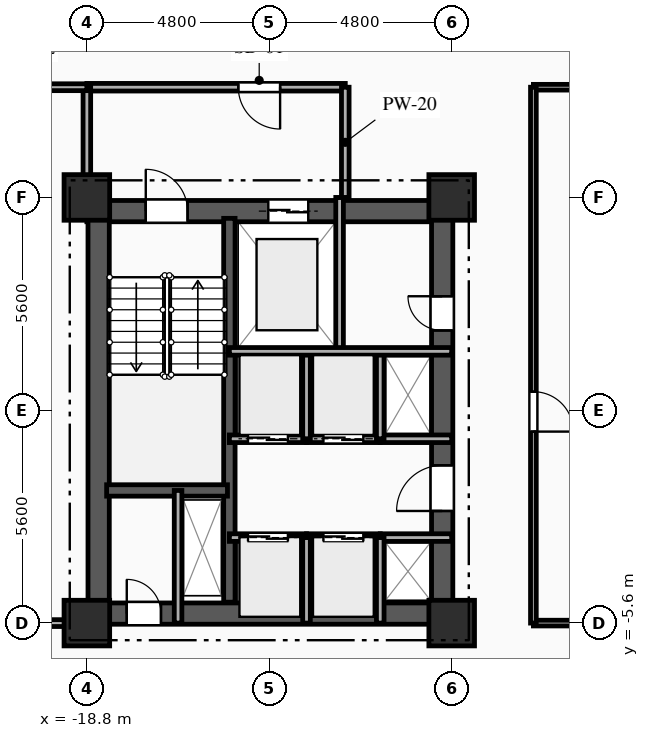
"""IFC4 building model, lengths in metres.
Left out: names, types, materials, properties, quantities, classifications, styles, units other than length and angle.
Written with IfcOpenShell. Run it as: python <this file> out.ifc"""

import sys

from ifc_helpers import new_model, si_unit, direction, frame, frame_2d, origin, origin_2d, place, context, subcontext, project, spatial, rectangle, extrude, element, fill, save


model = new_model("IFC4")
c1 = context("Model", 3, precision=1e-05, world=origin(), true_north=direction((0.0, 1.0)))
c2 = subcontext(c1, "Body", "Model", "MODEL_VIEW")
j1 = project(units=[si_unit("LENGTHUNIT", "METRE"), si_unit("PLANEANGLEUNIT", "RADIAN")], contexts=[c1])
p1 = place(None, origin())
s1 = spatial("IfcSite", under=j1, at=p1, CompositionType="ELEMENT")
p2 = place(p1, origin())
s2 = spatial("IfcBuilding", under=s1, at=p2, CompositionType="ELEMENT")
p3 = place(p2, frame((0.0, 0.0, 33.7)))
s3 = spatial("IfcBuildingStorey", under=s2, at=p3, CompositionType="ELEMENT", Elevation=33.7)
for number, where, z_axis, x_axis in (
    (1, (-18.8, -5.6, 0.0), (0.0, 0.0, 1.0), (1.0, 0.0, 0.0)),
    (2, (-18.8, 5.6, 0.0), (0.0, 0.0, 1.0), (1.0, 0.0, 0.0)),
    (3, (-9.2, -5.6, 0.0), (0.0, 0.0, 1.0), (1.0, 0.0, 0.0)),
    (4, (-9.2, 5.6, 0.0), (0.0, 0.0, 1.0), (1.0, 0.0, 0.0)),
):
    element("IfcColumn", number, at=place(p3, frame(where, z_axis=z_axis, x_axis=x_axis)), inside=s3, PredefinedType="COLUMN", context=c2, shape_type="SweptSolid", body=[
        extrude(rectangle(XDim=1.2, YDim=1.2, at=origin_2d()), origin(), (0.0, 0.0, 1.0), 3.35),
    ])
p4 = place(p3, frame((-18.8, 5.24, 0.0), z_axis=(0.0, 0.0, 1.0), x_axis=(1.0, 0.0, 0.0)))
e5 = element("IfcWall", 5, at=p4, inside=s3, PredefinedType="SHEAR", context=c2, shape_type="SweptSolid", body=[
    extrude(rectangle(XDim=9.6, YDim=0.56, at=frame_2d((4.8, 0.0))), origin(), (0.0, 0.0, 1.0), 3.035),
])
p5 = place(p4, frame((1.55, 0.0, 0.0)))
e6 = element("IfcOpeningElement", 6, at=p5, cuts=e5, PredefinedType="OPENING", context=c2, shape_type="SweptSolid", body=[
    extrude(rectangle(XDim=1.1, YDim=2.15, at=frame_2d((0.55, 1.075))), frame((0.0, 0.29, 0.0), z_axis=(0.0, -1.0, 0.0), x_axis=(1.0, 0.0, 0.0)), (0.0, 0.0, 1.0), 0.58),
])
p6 = place(p4, frame((4.775, 0.0, 0.0)))
e7 = element("IfcOpeningElement", 7, at=p6, cuts=e5, PredefinedType="OPENING", context=c2, shape_type="SweptSolid", body=[
    extrude(rectangle(XDim=1.05, YDim=2.1, at=frame_2d((0.525, 1.05))), frame((0.0, 0.29, 0.0), z_axis=(0.0, -1.0, 0.0), x_axis=(1.0, 0.0, 0.0)), (0.0, 0.0, 1.0), 0.58),
])
p7 = place(p3, frame((-18.8, -5.35, 0.0), z_axis=(0.0, 0.0, 1.0), x_axis=(1.0, 0.0, 0.0)))
e8 = element("IfcWall", 8, at=p7, inside=s3, PredefinedType="SHEAR", context=c2, shape_type="SweptSolid", body=[
    extrude(rectangle(XDim=9.6, YDim=0.56, at=frame_2d((4.8, 0.0))), origin(), (0.0, 0.0, 1.0), 3.035),
])
p8 = place(p7, frame((1.05, 0.0, 0.0)))
e9 = element("IfcOpeningElement", 9, at=p8, cuts=e8, PredefinedType="OPENING", context=c2, shape_type="SweptSolid", body=[
    extrude(rectangle(XDim=0.9, YDim=2.1, at=frame_2d((0.45, 1.05))), frame((0.0, 0.29, 0.0), z_axis=(0.0, -1.0, 0.0), x_axis=(1.0, 0.0, 0.0)), (0.0, 0.0, 1.0), 0.58),
])
p9 = place(p3, frame((-18.49, -5.05, 0.0), z_axis=(0.0, 0.0, 1.0), x_axis=(0.0, 1.0, 0.0)))
e10 = element("IfcWall", 10, at=p9, inside=s3, PredefinedType="SHEAR", context=c2, shape_type="SweptSolid", body=[
    extrude(rectangle(XDim=10.1, YDim=0.56, at=frame_2d((5.05, 0.0))), origin(), (0.0, 0.0, 1.0), 3.035),
])
p10 = place(p3, frame((-9.45, -5.05, 0.0), z_axis=(0.0, 0.0, 1.0), x_axis=(0.0, 1.0, 0.0)))
e11 = element("IfcWall", 11, at=p10, inside=s3, PredefinedType="SHEAR", context=c2, shape_type="SweptSolid", body=[
    extrude(rectangle(XDim=10.1, YDim=0.56, at=frame_2d((5.05, 0.0))), origin(), (0.0, 0.0, 1.0), 3.035),
])
p11 = place(p10, frame((7.15, 0.0, 0.0)))
e12 = element("IfcOpeningElement", 12, at=p11, cuts=e11, PredefinedType="OPENING", context=c2, shape_type="SweptSolid", body=[
    extrude(rectangle(XDim=0.9, YDim=2.1, at=frame_2d((0.45, 1.05))), frame((0.0, 0.29, 0.0), z_axis=(0.0, -1.0, 0.0), x_axis=(1.0, 0.0, 0.0)), (0.0, 0.0, 1.0), 0.58),
])
p12 = place(p10, frame((2.4, 0.0, 0.0)))
e13 = element("IfcOpeningElement", 13, at=p12, cuts=e11, PredefinedType="OPENING", context=c2, shape_type="SweptSolid", body=[
    extrude(rectangle(XDim=1.2, YDim=2.15, at=frame_2d((0.6, 1.075))), frame((0.0, 0.29, 0.0), z_axis=(0.0, -1.0, 0.0), x_axis=(1.0, 0.0, 0.0)), (0.0, 0.0, 1.0), 0.58),
])
p13 = place(p3, frame((-15.05, -5.05, 0.0), z_axis=(0.0, 0.0, 1.0), x_axis=(0.0, 1.0, 0.0)))
e14 = element("IfcWall", 14, at=p13, inside=s3, PredefinedType="SHEAR", context=c2, shape_type="SweptSolid", body=[
    extrude(rectangle(XDim=10.1, YDim=0.3, at=frame_2d((5.05, 0.0))), origin(), (0.0, 0.0, 1.0), 3.035),
])
p14 = place(p3, frame((-18.28, -2.11, 0.0), z_axis=(0.0, 0.0, 1.0), x_axis=(1.0, 0.0, 0.0)))
e15 = element("IfcWall", 15, at=p14, inside=s3, PredefinedType="SHEAR", context=c2, shape_type="SweptSolid", body=[
    extrude(rectangle(XDim=3.18, YDim=0.3, at=frame_2d((1.59, 0.0))), origin(), (0.0, 0.0, 1.0), 3.035),
])
p15 = place(p3, frame((-16.4, -5.6, 0.0), z_axis=(0.0, 0.0, 1.0), x_axis=(0.0, 1.0, 0.0)))
e16 = element("IfcWall", 16, at=p15, inside=s3, PredefinedType="PARTITIONING", context=c2, shape_type="SweptSolid", body=[
    extrude(rectangle(XDim=3.49, YDim=0.2, at=frame_2d((1.745, 0.0))), origin(), (0.0, 0.0, 1.0), 3.035),
])
p16 = place(p3, frame((-12.15, 1.55, 0.0), z_axis=(0.0, 0.0, 1.0), x_axis=(0.0, 1.0, 0.0)))
e17 = element("IfcWall", 17, at=p16, inside=s3, PredefinedType="PARTITIONING", context=c2, shape_type="SweptSolid", body=[
    extrude(rectangle(XDim=4.05, YDim=0.2, at=frame_2d((2.025, 0.0))), origin(), (0.0, 0.0, 1.0), 3.035),
])
p17 = place(p3, frame((-12.0, 8.5, 0.0), z_axis=(0.0, 0.0, 1.0), x_axis=(-1.0, 0.0, 0.0)))
e18 = element("IfcWall", 18, at=p17, inside=s3, PredefinedType="PARTITIONING", context=c2, shape_type="SweptSolid", body=[
    extrude(rectangle(XDim=6.8, YDim=0.2, at=frame_2d((3.4, 0.0))), origin(), (0.0, 0.0, 1.0), 3.035),
])
p18 = place(p17, frame((1.715, 0.0, 0.0)))
e19 = element("IfcOpeningElement", 19, at=p18, cuts=e18, PredefinedType="OPENING", context=c2, shape_type="SweptSolid", body=[
    extrude(rectangle(XDim=1.1, YDim=2.15, at=frame_2d((0.55, 1.075))), frame((0.0, 0.11, 0.0), z_axis=(0.0, -1.0, 0.0), x_axis=(1.0, 0.0, 0.0)), (0.0, 0.0, 1.0), 0.22),
])
p19 = place(p3, frame((-12.0, 5.6, 0.0), z_axis=(0.0, 0.0, 1.0), x_axis=(0.0, 1.0, 0.0)))
e20 = element("IfcWall", 20, at=p19, inside=s3, PredefinedType="PARTITIONING", context=c2, shape_type="SweptSolid", body=[
    extrude(rectangle(XDim=2.9, YDim=0.2, at=frame_2d((1.45, 0.0))), origin(), (0.0, 0.0, 1.0), 3.035),
])
p20 = place(p3, frame((-18.8, 8.5, 0.0), z_axis=(0.0, 0.0, 1.0), x_axis=(0.0, -1.0, 0.0)))
e21 = element("IfcWall", 21, at=p20, inside=s3, PredefinedType="PARTITIONING", context=c2, shape_type="SweptSolid", body=[
    extrude(rectangle(XDim=2.9, YDim=0.2, at=frame_2d((1.45, 0.0))), origin(), (0.0, 0.0, 1.0), 2.52),
])
p21 = place(p3, frame((-15.05, -3.35, 0.0), z_axis=(0.0, 0.0, 1.0), x_axis=(1.0, 0.0, 0.0)))
e22 = element("IfcWall", 22, at=p21, inside=s3, PredefinedType="PARTITIONING", context=c2, shape_type="SweptSolid", body=[
    extrude(rectangle(XDim=2.03, YDim=0.2, at=frame_2d((1.015, 0.0))), origin(), (0.0, 0.0, 1.0), 3.035),
])
p22 = place(p21, frame((0.49, 0.0, 0.0)))
e23 = element("IfcOpeningElement", 23, at=p22, cuts=e22, PredefinedType="OPENING", context=c2, shape_type="SweptSolid", body=[
    extrude(rectangle(XDim=1.05, YDim=2.1, at=frame_2d((0.525, 1.05))), frame((0.0, 0.11, 0.0), z_axis=(0.0, -1.0, 0.0), x_axis=(1.0, 0.0, 0.0)), (0.0, 0.0, 1.0), 0.22),
])
p23 = place(p3, frame((-13.02, -3.35, 0.0), z_axis=(0.0, 0.0, 1.0), x_axis=(1.0, 0.0, 0.0)))
e24 = element("IfcWall", 24, at=p23, inside=s3, PredefinedType="PARTITIONING", context=c2, shape_type="SweptSolid", body=[
    extrude(rectangle(XDim=1.94, YDim=0.2, at=frame_2d((0.97, 0.0))), origin(), (0.0, 0.0, 1.0), 3.035),
])
p24 = place(p23, frame((0.445, 0.0, 0.0)))
e25 = element("IfcOpeningElement", 25, at=p24, cuts=e24, PredefinedType="OPENING", context=c2, shape_type="SweptSolid", body=[
    extrude(rectangle(XDim=1.05, YDim=2.1, at=frame_2d((0.525, 1.05))), frame((0.0, 0.11, 0.0), z_axis=(0.0, -1.0, 0.0), x_axis=(1.0, 0.0, 0.0)), (0.0, 0.0, 1.0), 0.22),
])
p25 = place(p3, frame((-11.08, -3.35, 0.0), z_axis=(0.0, 0.0, 1.0), x_axis=(1.0, 0.0, 0.0)))
e26 = element("IfcWall", 26, at=p25, inside=s3, PredefinedType="PARTITIONING", context=c2, shape_type="SweptSolid", body=[
    extrude(rectangle(XDim=1.88, YDim=0.2, at=frame_2d((0.94, 0.0))), origin(), (0.0, 0.0, 1.0), 2.75),
])
p26 = place(p3, frame((-13.02, -0.75, 0.0), z_axis=(0.0, 0.0, 1.0), x_axis=(-1.0, 0.0, 0.0)))
e27 = element("IfcWall", 27, at=p26, inside=s3, PredefinedType="PARTITIONING", context=c2, shape_type="SweptSolid", body=[
    extrude(rectangle(XDim=2.03, YDim=0.2, at=frame_2d((1.015, 0.0))), origin(), (0.0, 0.0, 1.0), 3.035),
])
p27 = place(p26, frame((0.49, 0.0, 0.0)))
e28 = element("IfcOpeningElement", 28, at=p27, cuts=e27, PredefinedType="OPENING", context=c2, shape_type="SweptSolid", body=[
    extrude(rectangle(XDim=1.05, YDim=2.1, at=frame_2d((0.525, 1.05))), frame((0.0, 0.11, 0.0), z_axis=(0.0, -1.0, 0.0), x_axis=(1.0, 0.0, 0.0)), (0.0, 0.0, 1.0), 0.22),
])
p28 = place(p3, frame((-11.08, -0.75, 0.0), z_axis=(0.0, 0.0, 1.0), x_axis=(-1.0, 0.0, 0.0)))
e29 = element("IfcWall", 29, at=p28, inside=s3, PredefinedType="PARTITIONING", context=c2, shape_type="SweptSolid", body=[
    extrude(rectangle(XDim=1.94, YDim=0.2, at=frame_2d((0.97, 0.0))), origin(), (0.0, 0.0, 1.0), 3.035),
])
p29 = place(p28, frame((0.445, 0.0, 0.0)))
e30 = element("IfcOpeningElement", 30, at=p29, cuts=e29, PredefinedType="OPENING", context=c2, shape_type="SweptSolid", body=[
    extrude(rectangle(XDim=1.05, YDim=2.1, at=frame_2d((0.525, 1.05))), frame((0.0, 0.11, 0.0), z_axis=(0.0, -1.0, 0.0), x_axis=(1.0, 0.0, 0.0)), (0.0, 0.0, 1.0), 0.22),
])
p30 = place(p3, frame((-9.2, -0.75, 0.0), z_axis=(0.0, 0.0, 1.0), x_axis=(-1.0, 0.0, 0.0)))
e31 = element("IfcWall", 31, at=p30, inside=s3, PredefinedType="PARTITIONING", context=c2, shape_type="SweptSolid", body=[
    extrude(rectangle(XDim=1.88, YDim=0.2, at=frame_2d((0.94, 0.0))), origin(), (0.0, 0.0, 1.0), 3.035),
])
for number, where, z_axis, x_axis in (
    (32, (-13.02, -5.6, 0.0), (0.0, 0.0, 1.0), (0.0, 1.0, 0.0)),
    (33, (-11.08, -5.6, 0.0), (0.0, 0.0, 1.0), (0.0, 1.0, 0.0)),
):
    element("IfcWall", number, at=place(p3, frame(where, z_axis=z_axis, x_axis=x_axis)), inside=s3, PredefinedType="PARTITIONING", context=c2, shape_type="SweptSolid", body=[
        extrude(rectangle(XDim=2.25, YDim=0.2, at=frame_2d((1.125, 0.0))), origin(), (0.0, 0.0, 1.0), 3.035),
    ])
for number, where, z_axis, x_axis in (
    (34, (-13.02, -0.75, 0.0), (0.0, 0.0, 1.0), (0.0, 1.0, 0.0)),
    (35, (-11.08, -0.75, 0.0), (0.0, 0.0, 1.0), (0.0, 1.0, 0.0)),
):
    element("IfcWall", number, at=place(p3, frame(where, z_axis=z_axis, x_axis=x_axis)), inside=s3, PredefinedType="PARTITIONING", context=c2, shape_type="SweptSolid", body=[
        extrude(rectangle(XDim=2.3, YDim=0.2, at=frame_2d((1.15, 0.0))), origin(), (0.0, 0.0, 1.0), 3.035),
    ])
p31 = place(p3, frame((-18.8, 8.5, 0.0), z_axis=(0.0, 0.0, 1.0), x_axis=(-1.0, 0.0, 0.0)))
e36 = element("IfcWall", 36, at=p31, inside=s3, PredefinedType="PARTITIONING", context=c2, shape_type="SweptSolid", body=[
    extrude(rectangle(XDim=2.65, YDim=0.18, at=frame_2d((1.325, 0.0))), origin(), (0.0, 0.0, 1.0), 3.035),
])
p32 = place(p31, frame((1.009, 0.0, 0.0)))
e37 = element("IfcOpeningElement", 37, at=p32, cuts=e36, PredefinedType="OPENING", context=c2, shape_type="SweptSolid", body=[
    extrude(rectangle(XDim=1.0, YDim=2.15, at=frame_2d((0.5, 1.075))), frame((0.0, 0.1, 0.0), z_axis=(0.0, -1.0, 0.0), x_axis=(1.0, 0.0, 0.0)), (0.0, 0.0, 1.0), 0.2),
])
p33 = place(p3, frame((0.0, 8.5, 0.0), z_axis=(0.0, 0.0, 1.0), x_axis=(-1.0, 0.0, 0.0)))
e38 = element("IfcWall", 38, at=p33, inside=s3, PredefinedType="PARTITIONING", context=c2, shape_type="SweptSolid", body=[
    extrude(rectangle(XDim=7.05, YDim=0.15, at=frame_2d((3.525, 0.0))), origin(), (0.0, 0.0, 1.0), 3.035),
])
p34 = place(p3, frame((-21.45, -5.6, 0.0), z_axis=(0.0, 0.0, 1.0), x_axis=(1.0, 0.0, 0.0)))
e39 = element("IfcWall", 39, at=p34, inside=s3, PredefinedType="PARTITIONING", context=c2, shape_type="SweptSolid", body=[
    extrude(rectangle(XDim=2.65, YDim=0.18, at=frame_2d((1.325, 0.0))), origin(), (0.0, 0.0, 1.0), 3.035),
])
p35 = place(p3, frame((-7.05, -5.6, 0.0), z_axis=(0.0, 0.0, 1.0), x_axis=(1.0, 0.0, 0.0)))
e40 = element("IfcWall", 40, at=p35, inside=s3, PredefinedType="PARTITIONING", context=c2, shape_type="SweptSolid", body=[
    extrude(rectangle(XDim=7.05, YDim=0.15, at=frame_2d((3.525, 0.0))), origin(), (0.0, 0.0, 1.0), 2.52),
])
p36 = place(p3, frame((-7.05, 8.5, 0.0), z_axis=(0.0, 0.0, 1.0), x_axis=(0.0, -1.0, 0.0)))
e41 = element("IfcWall", 41, at=p36, inside=s3, PredefinedType="PARTITIONING", context=c2, shape_type="SweptSolid", body=[
    extrude(rectangle(XDim=14.1, YDim=0.15, at=frame_2d((7.05, 0.0))), origin(), (0.0, 0.0, 1.0), 3.035),
])
p37 = place(p36, frame((8.011, 0.0, 0.0)))
e42 = element("IfcOpeningElement", 42, at=p37, cuts=e41, PredefinedType="OPENING", context=c2, shape_type="SweptSolid", body=[
    extrude(rectangle(XDim=1.05, YDim=2.15, at=frame_2d((0.525, 1.075))), frame((0.0, 0.085, 0.0), z_axis=(0.0, -1.0, 0.0), x_axis=(1.0, 0.0, 0.0)), (0.0, 0.0, 1.0), 0.17),
])
p38 = place(p3, frame((-15.05, 1.55, 0.0), z_axis=(0.0, 0.0, 1.0), x_axis=(1.0, 0.0, 0.0)))
e43 = element("IfcWall", 43, at=p38, inside=s3, PredefinedType="PARTITIONING", context=c2, shape_type="SweptSolid", body=[
    extrude(rectangle(XDim=5.85, YDim=0.2, at=frame_2d((2.925, 0.0))), origin(), (0.0, 0.0, 1.0), 3.035),
])
p39 = place(p5, origin())
e44 = element("IfcDoor", 44, at=p39, inside=s3, OperationType="SINGLE_SWING_LEFT", PredefinedType="DOOR", context=c2, shape_type="SweptSolid", body=[
    extrude(rectangle(XDim=1.1, YDim=2.15, at=frame_2d((0.55, 1.075))), frame((0.0, 0.025, 0.0), z_axis=(0.0, -1.0, 0.0), x_axis=(1.0, 0.0, 0.0)), (0.0, 0.0, 1.0), 0.05),
])
fill(e6, e44)
p40 = place(p6, origin())
e45 = element("IfcDoor", 45, at=p40, inside=s3, OperationType="DOUBLE_DOOR_SLIDING", PredefinedType="DOOR", context=c2, shape_type="SweptSolid", body=[
    extrude(rectangle(XDim=1.05, YDim=2.1, at=frame_2d((0.525, 1.05))), frame((0.0, 0.025, 0.0), z_axis=(0.0, -1.0, 0.0), x_axis=(1.0, 0.0, 0.0)), (0.0, 0.0, 1.0), 0.05),
])
fill(e7, e45)
p41 = place(p8, origin())
e46 = element("IfcDoor", 46, at=p41, inside=s3, OperationType="SINGLE_SWING_LEFT", PredefinedType="DOOR", context=c2, shape_type="SweptSolid", body=[
    extrude(rectangle(XDim=0.9, YDim=2.1, at=frame_2d((0.45, 1.05))), frame((0.0, 0.025, 0.0), z_axis=(0.0, -1.0, 0.0), x_axis=(1.0, 0.0, 0.0)), (0.0, 0.0, 1.0), 0.05),
])
fill(e9, e46)
p42 = place(p18, origin())
e47 = element("IfcDoor", 47, at=p42, inside=s3, OperationType="SINGLE_SWING_LEFT", PredefinedType="DOOR", context=c2, shape_type="SweptSolid", body=[
    extrude(rectangle(XDim=1.1, YDim=2.15, at=frame_2d((0.55, 1.075))), frame((0.0, 0.025, 0.0), z_axis=(0.0, -1.0, 0.0), x_axis=(1.0, 0.0, 0.0)), (0.0, 0.0, 1.0), 0.05),
])
fill(e19, e47)
p43 = place(p11, origin())
e48 = element("IfcDoor", 48, at=p43, inside=s3, OperationType="SINGLE_SWING_RIGHT", PredefinedType="DOOR", context=c2, shape_type="SweptSolid", body=[
    extrude(rectangle(XDim=0.9, YDim=2.1, at=frame_2d((0.45, 1.05))), frame((0.0, 0.025, 0.0), z_axis=(0.0, -1.0, 0.0), x_axis=(1.0, 0.0, 0.0)), (0.0, 0.0, 1.0), 0.05),
])
fill(e12, e48)
p44 = place(p22, origin())
e49 = element("IfcDoor", 49, at=p44, inside=s3, OperationType="DOUBLE_DOOR_SLIDING", PredefinedType="DOOR", context=c2, shape_type="SweptSolid", body=[
    extrude(rectangle(XDim=1.05, YDim=2.1, at=frame_2d((0.525, 1.05))), frame((0.0, 0.025, 0.0), z_axis=(0.0, -1.0, 0.0), x_axis=(1.0, 0.0, 0.0)), (0.0, 0.0, 1.0), 0.05),
])
fill(e23, e49)
p45 = place(p24, origin())
e50 = element("IfcDoor", 50, at=p45, inside=s3, OperationType="DOUBLE_DOOR_SLIDING", PredefinedType="DOOR", context=c2, shape_type="SweptSolid", body=[
    extrude(rectangle(XDim=1.05, YDim=2.1, at=frame_2d((0.525, 1.05))), frame((0.0, 0.025, 0.0), z_axis=(0.0, -1.0, 0.0), x_axis=(1.0, 0.0, 0.0)), (0.0, 0.0, 1.0), 0.05),
])
fill(e25, e50)
p46 = place(p27, origin())
e51 = element("IfcDoor", 51, at=p46, inside=s3, OperationType="DOUBLE_DOOR_SLIDING", PredefinedType="DOOR", context=c2, shape_type="SweptSolid", body=[
    extrude(rectangle(XDim=1.05, YDim=2.1, at=frame_2d((0.525, 1.05))), frame((0.0, 0.025, 0.0), z_axis=(0.0, -1.0, 0.0), x_axis=(1.0, 0.0, 0.0)), (0.0, 0.0, 1.0), 0.05),
])
fill(e28, e51)
p47 = place(p29, origin())
e52 = element("IfcDoor", 52, at=p47, inside=s3, OperationType="DOUBLE_DOOR_SLIDING", PredefinedType="DOOR", context=c2, shape_type="SweptSolid", body=[
    extrude(rectangle(XDim=1.05, YDim=2.1, at=frame_2d((0.525, 1.05))), frame((0.0, 0.025, 0.0), z_axis=(0.0, -1.0, 0.0), x_axis=(1.0, 0.0, 0.0)), (0.0, 0.0, 1.0), 0.05),
])
fill(e30, e52)
p48 = place(p12, origin())
e53 = element("IfcDoor", 53, at=p48, inside=s3, OperationType="SINGLE_SWING_LEFT", PredefinedType="DOOR", context=c2, shape_type="SweptSolid", body=[
    extrude(rectangle(XDim=1.2, YDim=2.15, at=frame_2d((0.6, 1.075))), frame((0.0, 0.025, 0.0), z_axis=(0.0, -1.0, 0.0), x_axis=(1.0, 0.0, 0.0)), (0.0, 0.0, 1.0), 0.05),
])
fill(e13, e53)
p49 = place(p37, origin())
e54 = element("IfcDoor", 54, at=p49, inside=s3, OperationType="SINGLE_SWING_RIGHT", PredefinedType="DOOR", context=c2, shape_type="SweptSolid", body=[
    extrude(rectangle(XDim=1.05, YDim=2.15, at=frame_2d((0.525, 1.075))), frame((0.0, 0.025, 0.0), z_axis=(0.0, -1.0, 0.0), x_axis=(1.0, 0.0, 0.0)), (0.0, 0.0, 1.0), 0.05),
])
fill(e42, e54)
save(model, sys.argv[1])
